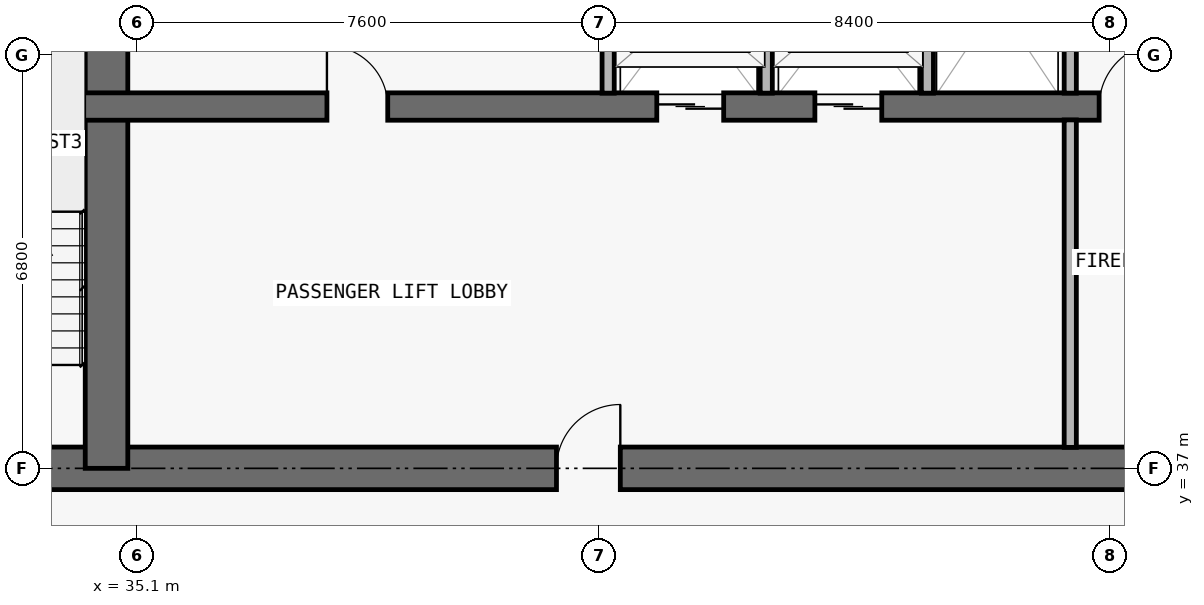
"""IFC4 building model, lengths in metres.
Left out: names, types, materials, properties, quantities, classifications, styles, units other than length and angle.
Written with IfcOpenShell. Run it as: python <this file> out.ifc"""

import sys

from ifc_helpers import new_model, si_unit, direction, frame, frame_2d, origin, place, context, subcontext, project, spatial, rectangle, extrude, element, fill, save


model = new_model("IFC4")
c1 = context("Model", 3, precision=1e-05, world=origin(), true_north=direction((0.0, 1.0)))
c2 = subcontext(c1, "Body", "Model", "MODEL_VIEW")
j1 = project(units=[si_unit("LENGTHUNIT", "METRE"), si_unit("PLANEANGLEUNIT", "RADIAN")], contexts=[c1])
p1 = place(None, origin())
s1 = spatial("IfcSite", under=j1, at=p1, CompositionType="ELEMENT")
p2 = place(p1, origin())
s2 = spatial("IfcBuilding", under=s1, at=p2, CompositionType="ELEMENT")
p3 = place(p2, frame((0.0, 0.0, 157.2)))
s3 = spatial("IfcBuildingStorey", under=s2, at=p3, CompositionType="ELEMENT", Elevation=157.2)
p4 = place(p3, frame((17.95, 37.0, 0.0), z_axis=(0.0, 0.0, 1.0), x_axis=(1.0, 0.0, 0.0)))
e1 = element("IfcWall", 1, at=p4, inside=s3, PredefinedType="SHEAR", context=c2, shape_type="SweptSolid", body=[
    extrude(rectangle(XDim=41.9, YDim=0.7, at=frame_2d((20.95, 0.0))), origin(), (0.0, 0.0, 1.0), 3.05),
])
p5 = place(p4, frame((14.35, 0.0, 0.0)))
e2 = element("IfcOpeningElement", 2, at=p5, cuts=e1, PredefinedType="OPENING", context=c2, shape_type="SweptSolid", body=[
    extrude(rectangle(XDim=1.1, YDim=2.15, at=frame_2d((0.55, 1.075))), frame((0.0, 0.36, 0.0), z_axis=(0.0, -1.0, 0.0), x_axis=(1.0, 0.0, 0.0)), (0.0, 0.0, 1.0), 0.72),
])
p6 = place(p4, frame((6.2, 0.0, 0.0)))
e3 = element("IfcOpeningElement", 3, at=p6, cuts=e1, PredefinedType="OPENING", context=c2, shape_type="SweptSolid", body=[
    extrude(rectangle(XDim=1.05, YDim=2.15, at=frame_2d((0.525, 1.075))), frame((0.0, 0.36, 0.0), z_axis=(0.0, -1.0, 0.0), x_axis=(1.0, 0.0, 0.0)), (0.0, 0.0, 1.0), 0.72),
])
p7 = place(p4, frame((34.7, 0.0, 0.0)))
e4 = element("IfcOpeningElement", 4, at=p7, cuts=e1, PredefinedType="OPENING", context=c2, shape_type="SweptSolid", body=[
    extrude(rectangle(XDim=1.05, YDim=2.15, at=frame_2d((0.525, 1.075))), frame((0.0, 0.36, 0.0), z_axis=(0.0, -1.0, 0.0), x_axis=(1.0, 0.0, 0.0)), (0.0, 0.0, 1.0), 0.72),
])
p8 = place(p4, frame((10.812, 0.0, 0.0)))
e5 = element("IfcOpeningElement", 5, at=p8, cuts=e1, PredefinedType="OPENING", context=c2, shape_type="SweptSolid", body=[
    extrude(rectangle(XDim=1.05, YDim=2.15, at=frame_2d((0.525, 1.075))), frame((0.0, 0.36, 0.0), z_axis=(0.0, -1.0, 0.0), x_axis=(1.0, 0.0, 0.0)), (0.0, 0.0, 1.0), 0.72),
])
p9 = place(p4, frame((24.05, 0.0, 0.0)))
e6 = element("IfcOpeningElement", 6, at=p9, cuts=e1, PredefinedType="OPENING", context=c2, shape_type="SweptSolid", body=[
    extrude(rectangle(XDim=1.05, YDim=2.15, at=frame_2d((0.525, 1.075))), frame((0.0, 0.36, 0.0), z_axis=(0.0, -1.0, 0.0), x_axis=(1.0, 0.0, 0.0)), (0.0, 0.0, 1.0), 0.72),
])
p10 = place(p3, frame((34.6, 37.0, 0.0), z_axis=(0.0, 0.0, 1.0), x_axis=(0.0, 1.0, 0.0)))
e7 = element("IfcWall", 7, at=p10, inside=s3, PredefinedType="SHEAR", context=c2, shape_type="SweptSolid", body=[
    extrude(rectangle(XDim=9.575, YDim=0.7, at=frame_2d((4.788, 0.0))), origin(), (0.0, 0.0, 1.0), 3.05),
])
p11 = place(p3, frame((22.25, 42.95, 0.0), z_axis=(0.0, 0.0, 1.0), x_axis=(1.0, 0.0, 0.0)))
e8 = element("IfcWall", 8, at=p11, inside=s3, PredefinedType="SHEAR", context=c2, shape_type="SweptSolid", body=[
    extrude(rectangle(XDim=33.3, YDim=0.45, at=frame_2d((16.65, 0.0))), origin(), (0.0, 0.0, 1.0), 3.05),
])
p12 = place(p11, frame((1.05, 0.0, 0.0)))
e9 = element("IfcOpeningElement", 9, at=p12, cuts=e8, PredefinedType="OPENING", context=c2, shape_type="SweptSolid", body=[
    extrude(rectangle(XDim=1.2, YDim=2.2, at=frame_2d((0.6, 1.1))), frame((0.0, 0.235, 0.0), z_axis=(0.0, -1.0, 0.0), x_axis=(1.0, 0.0, 0.0)), (0.0, 0.0, 1.0), 0.47),
])
p13 = place(p11, frame((31.05, 0.0, 0.0)))
e10 = element("IfcOpeningElement", 10, at=p13, cuts=e8, PredefinedType="OPENING", context=c2, shape_type="SweptSolid", body=[
    extrude(rectangle(XDim=1.2, YDim=2.2, at=frame_2d((0.6, 1.1))), frame((0.0, 0.235, 0.0), z_axis=(0.0, -1.0, 0.0), x_axis=(1.0, 0.0, 0.0)), (0.0, 0.0, 1.0), 0.47),
])
p14 = place(p11, frame((21.4, 0.0, 0.0)))
e11 = element("IfcOpeningElement", 11, at=p14, cuts=e8, PredefinedType="OPENING", context=c2, shape_type="SweptSolid", body=[
    extrude(rectangle(XDim=1.1, YDim=2.2, at=frame_2d((0.55, 1.1))), frame((0.0, 0.235, 0.0), z_axis=(0.0, -1.0, 0.0), x_axis=(1.0, 0.0, 0.0)), (0.0, 0.0, 1.0), 0.47),
])
p15 = place(p11, frame((24.0, 0.0, 0.0)))
e12 = element("IfcOpeningElement", 12, at=p15, cuts=e8, PredefinedType="OPENING", context=c2, shape_type="SweptSolid", body=[
    extrude(rectangle(XDim=1.1, YDim=2.2, at=frame_2d((0.55, 1.1))), frame((0.0, 0.235, 0.0), z_axis=(0.0, -1.0, 0.0), x_axis=(1.0, 0.0, 0.0)), (0.0, 0.0, 1.0), 0.47),
])
p16 = place(p11, frame((3.625, 0.0, 0.0)))
e13 = element("IfcOpeningElement", 13, at=p16, cuts=e8, PredefinedType="OPENING", context=c2, shape_type="SweptSolid", body=[
    extrude(rectangle(XDim=1.05, YDim=2.15, at=frame_2d((0.525, 1.075))), frame((0.0, 0.235, 0.0), z_axis=(0.0, -1.0, 0.0), x_axis=(1.0, 0.0, 0.0)), (0.0, 0.0, 1.0), 0.47),
])
p17 = place(p11, frame((28.675, 0.0, 0.0)))
e14 = element("IfcOpeningElement", 14, at=p17, cuts=e8, PredefinedType="OPENING", context=c2, shape_type="SweptSolid", body=[
    extrude(rectangle(XDim=1.05, YDim=2.15, at=frame_2d((0.525, 1.075))), frame((0.0, 0.235, 0.0), z_axis=(0.0, -1.0, 0.0), x_axis=(1.0, 0.0, 0.0)), (0.0, 0.0, 1.0), 0.47),
])
p18 = place(p11, frame((15.975, 0.0, 0.0)))
e15 = element("IfcOpeningElement", 15, at=p18, cuts=e8, PredefinedType="OPENING", context=c2, shape_type="SweptSolid", body=[
    extrude(rectangle(XDim=1.0, YDim=2.2, at=frame_2d((0.5, 1.1))), frame((0.0, 0.235, 0.0), z_axis=(0.0, -1.0, 0.0), x_axis=(1.0, 0.0, 0.0)), (0.0, 0.0, 1.0), 0.47),
])
for number, where, z_axis, x_axis in (
    (16, (42.85, 43.17, 0.0), (0.0, 0.0, 1.0), (0.0, 1.0, 0.0)),
    (17, (45.45, 43.17, 0.0), (0.0, 0.0, 1.0), (0.0, 1.0, 0.0)),
    (18, (48.1, 43.17, 0.0), (0.0, 0.0, 1.0), (0.0, 1.0, 0.0)),
):
    element("IfcWall", number, at=place(p3, frame(where, z_axis=z_axis, x_axis=x_axis)), inside=s3, PredefinedType="PARTITIONING", context=c2, shape_type="SweptSolid", body=[
        extrude(rectangle(XDim=3.185, YDim=0.2, at=frame_2d((1.593, 0.0))), origin(), (0.0, 0.0, 1.0), 3.05),
    ])
p19 = place(p3, frame((50.45, 37.345, 0.0), z_axis=(0.0, 0.0, 1.0), x_axis=(0.0, 1.0, 0.0)))
e19 = element("IfcWall", 19, at=p19, inside=s3, PredefinedType="PARTITIONING", context=c2, shape_type="SweptSolid", body=[
    extrude(rectangle(XDim=5.385, YDim=0.2, at=frame_2d((2.692, 0.0))), origin(), (0.0, 0.0, 1.0), 3.05),
])
p20 = place(p3, frame((50.45, 43.17, 0.0), z_axis=(0.0, 0.0, 1.0), x_axis=(0.0, 1.0, 0.0)))
e20 = element("IfcWall", 20, at=p20, inside=s3, PredefinedType="PARTITIONING", context=c2, shape_type="SweptSolid", body=[
    extrude(rectangle(XDim=3.185, YDim=0.2, at=frame_2d((1.593, 0.0))), origin(), (0.0, 0.0, 1.0), 3.05),
])
p21 = place(p14, origin())
e21 = element("IfcDoor", 21, at=p21, inside=s3, OperationType="DOUBLE_DOOR_SLIDING", PredefinedType="DOOR", context=c2, shape_type="SweptSolid", body=[
    extrude(rectangle(XDim=1.1, YDim=2.2, at=frame_2d((0.55, 1.1))), frame((0.0, 0.025, 0.0), z_axis=(0.0, -1.0, 0.0), x_axis=(1.0, 0.0, 0.0)), (0.0, 0.0, 1.0), 0.05),
])
fill(e11, e21)
p22 = place(p15, origin())
e22 = element("IfcDoor", 22, at=p22, inside=s3, OperationType="DOUBLE_DOOR_SLIDING", PredefinedType="DOOR", context=c2, shape_type="SweptSolid", body=[
    extrude(rectangle(XDim=1.1, YDim=2.2, at=frame_2d((0.55, 1.1))), frame((0.0, 0.025, 0.0), z_axis=(0.0, -1.0, 0.0), x_axis=(1.0, 0.0, 0.0)), (0.0, 0.0, 1.0), 0.05),
])
fill(e12, e22)
p23 = place(p17, origin())
e23 = element("IfcDoor", 23, at=p23, inside=s3, OperationType="SINGLE_SWING_RIGHT", PredefinedType="DOOR", context=c2, shape_type="SweptSolid", body=[
    extrude(rectangle(XDim=1.05, YDim=2.15, at=frame_2d((0.525, 1.075))), frame((0.0, 0.025, 0.0), z_axis=(0.0, -1.0, 0.0), x_axis=(1.0, 0.0, 0.0)), (0.0, 0.0, 1.0), 0.05),
])
fill(e14, e23)
p24 = place(p9, origin())
e24 = element("IfcDoor", 24, at=p24, inside=s3, OperationType="SINGLE_SWING_RIGHT", PredefinedType="DOOR", context=c2, shape_type="SweptSolid", body=[
    extrude(rectangle(XDim=1.05, YDim=2.15, at=frame_2d((0.525, 1.075))), frame((0.0, 0.025, 0.0), z_axis=(0.0, -1.0, 0.0), x_axis=(1.0, 0.0, 0.0)), (0.0, 0.0, 1.0), 0.05),
])
fill(e6, e24)
p25 = place(p18, origin())
e25 = element("IfcDoor", 25, at=p25, inside=s3, OperationType="SINGLE_SWING_LEFT", PredefinedType="DOOR", context=c2, shape_type="SweptSolid", body=[
    extrude(rectangle(XDim=1.0, YDim=2.2, at=frame_2d((0.5, 1.1))), frame((0.0, 0.025, 0.0), z_axis=(0.0, -1.0, 0.0), x_axis=(1.0, 0.0, 0.0)), (0.0, 0.0, 1.0), 0.05),
])
fill(e15, e25)
save(model, sys.argv[1])
